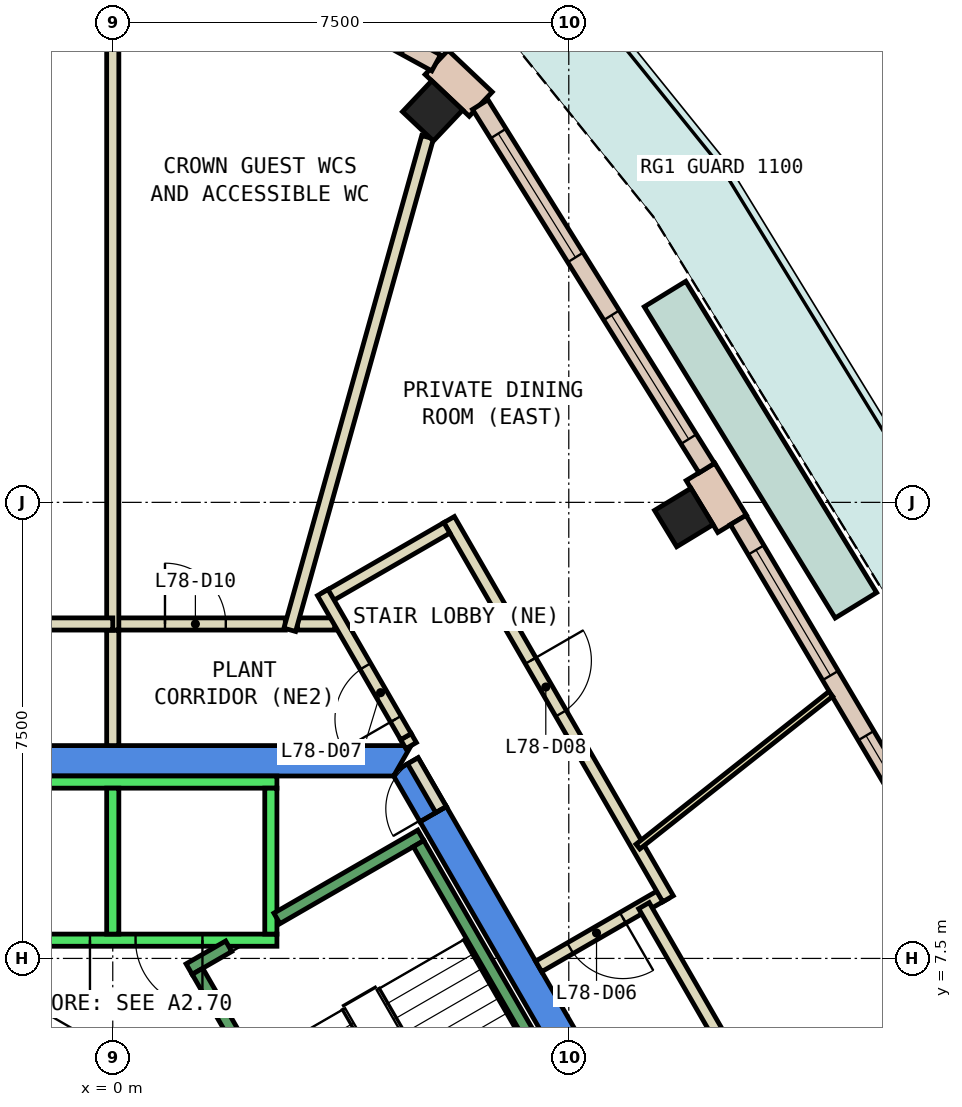
"""IFC4 building model, lengths in metres.
Left out: names, types, materials, properties, quantities, classifications, styles, units other than length and angle.
Written with IfcOpenShell. Run it as: python <this file> out.ifc"""

import sys

from ifc_helpers import new_model, si_unit, direction, frame, frame_2d, origin, origin_2d, place, context, subcontext, project, spatial, polyline, rectangle, outline, extrude, element, fill, save


model = new_model("IFC4")
c1 = context("Model", 3, precision=1e-05, world=origin(), true_north=direction((0.0, 1.0)))
c2 = subcontext(c1, "Body", "Model", "MODEL_VIEW")
j1 = project(units=[si_unit("LENGTHUNIT", "METRE"), si_unit("PLANEANGLEUNIT", "RADIAN")], contexts=[c1])
p1 = place(None, origin())
s1 = spatial("IfcSite", under=j1, at=p1, CompositionType="ELEMENT")
p2 = place(p1, origin())
s2 = spatial("IfcBuilding", under=s1, at=p2, CompositionType="ELEMENT")
p3 = place(p2, frame((0.0, 0.0, 331.4)))
s3 = spatial("IfcBuildingStorey", under=s2, at=p3, CompositionType="ELEMENT", Elevation=331.4)
for number, where, z_axis, x_axis in (
    (1, (9.392, 14.751, 0.0), (0.0, 0.0, 1.0), (-0.519, 0.855, 0.0)),
    (2, (5.26, 21.438, 0.0), (0.0, 0.0, 1.0), (-0.727, 0.687, 0.0)),
):
    element("IfcColumn", number, at=place(p3, frame(where, z_axis=z_axis, x_axis=x_axis)), inside=s3, PredefinedType="COLUMN", context=c2, shape_type="SweptSolid", body=[
        extrude(rectangle(XDim=0.7, YDim=0.7, at=origin_2d()), origin(), (0.0, 0.0, 1.0), 4.15),
    ])
p4 = place(p3, frame((0.0, 0.0, -0.45)))
e3 = element("IfcWall", 3, at=p4, inside=s3, PredefinedType="SHEAR", context=c2, shape_type="SweptSolid", body=[
    extrude(outline(polyline([(5.486, 9.998), (5.053, 9.748), (9.238, 2.5), (9.815, 2.5), (5.486, 9.998)])), origin(), (0.0, 0.0, 1.0), 4.6),
])
p5 = place(p3, frame((0.0, 0.0, 3.6)))
e4 = element("IfcWall", 4, at=p5, inside=s3, PredefinedType="SHEAR", context=c2, shape_type="SweptSolid", body=[
    extrude(outline(polyline([(5.022, 10.8), (4.677, 10.601), (4.619, 10.5), (5.053, 9.748), (5.486, 9.998), (5.022, 10.8)])), origin(), (0.0, 0.0, 1.0), 0.55),
])
p6 = place(p3, frame((0.0, 0.0, -0.45)))
e5 = element("IfcWall", 5, at=p6, inside=s3, PredefinedType="SHEAR", context=c2, shape_type="SweptSolid", body=[
    extrude(outline(polyline([(4.907, 11.0), (-4.907, 11.0), (-4.619, 10.5), (4.619, 10.5), (4.907, 11.0)])), origin(), (0.0, 0.0, 1.0), 4.6),
])
p7 = place(p3, frame((10.186, 14.648, 0.0), z_axis=(0.0, 0.0, 1.0), x_axis=(-0.520086370604, 0.854113673414, 0.0)))
e6 = element("IfcWall", 6, at=p7, inside=s3, PredefinedType="STANDARD", context=c2, shape_type="SweptSolid", body=[
    extrude(rectangle(XDim=1.0, YDim=0.55, at=frame_2d((0.5, 0.0))), origin(), (0.0, 0.0, 1.0), 4.15),
])
p8 = place(p3, frame((6.052, 21.549, 0.0), z_axis=(0.0, 0.0, 1.0), x_axis=(-0.726376136967, 0.687297393888, 0.0)))
e7 = element("IfcWall", 7, at=p8, inside=s3, PredefinedType="STANDARD", context=c2, shape_type="SweptSolid", body=[
    extrude(rectangle(XDim=1.0, YDim=0.55, at=frame_2d((0.5, 0.0))), origin(), (0.0, 0.0, 1.0), 4.15),
])
p9 = place(p3, frame((13.905, 8.604, 0.0), z_axis=(0.0, 0.0, 1.0), x_axis=(-0.509697735304, 0.86035354281, 0.0)))
e8 = element("IfcWall", 8, at=p9, inside=s3, PredefinedType="STANDARD", context=c2, shape_type="SweptSolid", body=[
    extrude(rectangle(XDim=7.098, YDim=0.3, at=frame_2d((3.549, 0.0))), origin(), (0.0, 0.0, 1.0), 4.15),
])
p10 = place(p9, frame((0.575, 0.0, 0.9)))
e9 = element("IfcOpeningElement", 9, at=p10, cuts=e8, PredefinedType="OPENING", context=c2, shape_type="SweptSolid", body=[
    extrude(rectangle(XDim=2.4, YDim=3.0, at=frame_2d((1.2, 1.5))), frame((0.0, 0.16, 0.0), z_axis=(0.0, -1.0, 0.0), x_axis=(1.0, 0.0, 0.0)), (0.0, 0.0, 1.0), 0.32),
])
p11 = place(p9, frame((4.124, 0.0, 0.9)))
e10 = element("IfcOpeningElement", 10, at=p11, cuts=e8, PredefinedType="OPENING", context=c2, shape_type="SweptSolid", body=[
    extrude(rectangle(XDim=2.4, YDim=3.0, at=frame_2d((1.2, 1.5))), frame((0.0, 0.16, 0.0), z_axis=(0.0, -1.0, 0.0), x_axis=(1.0, 0.0, 0.0)), (0.0, 0.0, 1.0), 0.32),
])
p12 = place(p3, frame((9.769, 15.564, 0.0), z_axis=(0.0, 0.0, 1.0), x_axis=(-0.528920387505, 0.848671446251, 0.0)))
e11 = element("IfcWall", 11, at=p12, inside=s3, PredefinedType="STANDARD", context=c2, shape_type="SweptSolid", body=[
    extrude(rectangle(XDim=7.043, YDim=0.3, at=frame_2d((3.521, 0.0))), origin(), (0.0, 0.0, 1.0), 4.15),
])
p13 = place(p12, frame((0.561, 0.0, 0.9)))
e12 = element("IfcOpeningElement", 12, at=p13, cuts=e11, PredefinedType="OPENING", context=c2, shape_type="SweptSolid", body=[
    extrude(rectangle(XDim=2.4, YDim=3.0, at=frame_2d((1.2, 1.5))), frame((0.0, 0.16, 0.0), z_axis=(0.0, -1.0, 0.0), x_axis=(1.0, 0.0, 0.0)), (0.0, 0.0, 1.0), 0.32),
])
p14 = place(p12, frame((4.082, 0.0, 0.9)))
e13 = element("IfcOpeningElement", 13, at=p14, cuts=e11, PredefinedType="OPENING", context=c2, shape_type="SweptSolid", body=[
    extrude(rectangle(XDim=2.4, YDim=3.0, at=frame_2d((1.2, 1.5))), frame((0.0, 0.16, 0.0), z_axis=(0.0, -1.0, 0.0), x_axis=(1.0, 0.0, 0.0)), (0.0, 0.0, 1.0), 0.32),
])
p15 = place(p3, frame((5.319, 22.227, 0.0), z_axis=(0.0, 0.0, 1.0), x_axis=(-0.877068569324, 0.480365199305, 0.0)))
e14 = element("IfcWall", 14, at=p15, inside=s3, PredefinedType="STANDARD", context=c2, shape_type="SweptSolid", body=[
    extrude(rectangle(XDim=5.04, YDim=0.3, at=frame_2d((2.52, 0.0))), origin(), (0.0, 0.0, 1.0), 4.15),
])
p16 = place(p15, frame((0.56, 0.0, 0.9)))
e15 = element("IfcOpeningElement", 15, at=p16, cuts=e14, PredefinedType="OPENING", context=c2, shape_type="SweptSolid", body=[
    extrude(rectangle(XDim=1.4, YDim=3.0, at=frame_2d((0.7, 1.5))), frame((0.0, 0.16, 0.0), z_axis=(0.0, -1.0, 0.0), x_axis=(1.0, 0.0, 0.0)), (0.0, 0.0, 1.0), 0.32),
])
p17 = place(p15, frame((3.08, 0.0, 0.9)))
e16 = element("IfcOpeningElement", 16, at=p17, cuts=e14, PredefinedType="OPENING", context=c2, shape_type="SweptSolid", body=[
    extrude(rectangle(XDim=1.4, YDim=3.0, at=frame_2d((0.7, 1.5))), frame((0.0, 0.16, 0.0), z_axis=(0.0, -1.0, 0.0), x_axis=(1.0, 0.0, 0.0)), (0.0, 0.0, 1.0), 0.32),
])
p18 = place(p3, frame((-0.899, 24.648, 0.0), z_axis=(0.0, 0.0, 1.0), x_axis=(-0.877068569324, -0.480365199305, 0.0)))
e17 = element("IfcWall", 17, at=p18, inside=s3, PredefinedType="STANDARD", context=c2, shape_type="SweptSolid", body=[
    extrude(rectangle(XDim=5.04, YDim=0.3, at=frame_2d((2.52, 0.0))), origin(), (0.0, 0.0, 1.0), 4.15),
])
p19 = place(p18, frame((0.56, 0.0, 0.9)))
e18 = element("IfcOpeningElement", 18, at=p19, cuts=e17, PredefinedType="OPENING", context=c2, shape_type="SweptSolid", body=[
    extrude(rectangle(XDim=1.4, YDim=3.0, at=frame_2d((0.7, 1.5))), frame((0.0, 0.16, 0.0), z_axis=(0.0, -1.0, 0.0), x_axis=(1.0, 0.0, 0.0)), (0.0, 0.0, 1.0), 0.32),
])
p20 = place(p18, frame((3.08, 0.0, 0.9)))
e19 = element("IfcOpeningElement", 19, at=p20, cuts=e17, PredefinedType="OPENING", context=c2, shape_type="SweptSolid", body=[
    extrude(rectangle(XDim=1.4, YDim=3.0, at=frame_2d((0.7, 1.5))), frame((0.0, 0.16, 0.0), z_axis=(0.0, -1.0, 0.0), x_axis=(1.0, 0.0, 0.0)), (0.0, 0.0, 1.0), 0.32),
])
p21 = place(p3, frame((12.222, 13.307, 0.0), z_axis=(0.0, 0.0, 1.0), x_axis=(-0.522728889832, 0.852498978143, 0.0)))
e20 = element("IfcWall", 20, at=p21, inside=s3, PredefinedType="STANDARD", context=c2, shape_type="SweptSolid", body=[
    extrude(rectangle(XDim=6.005, YDim=0.8, at=frame_2d((3.002, 0.0))), origin(), (0.0, 0.0, 1.0), 0.8),
])
p22 = place(p3, frame((9.082, 8.568, 0.0), z_axis=(0.0, 0.0, 1.0), x_axis=(-0.865955154139, -0.50012165622, 0.0)))
e21 = element("IfcWall", 21, at=p22, inside=s3, PredefinedType="PARTITIONING", context=c2, shape_type="SweptSolid", body=[
    extrude(rectangle(XDim=2.4, YDim=0.2, at=frame_2d((1.2, 0.0))), origin(), (0.0, 0.0, 1.0), 4.15),
])
p23 = place(p22, frame((0.8, 0.0, 0.0)))
e22 = element("IfcOpeningElement", 22, at=p23, cuts=e21, PredefinedType="OPENING", context=c2, shape_type="SweptSolid", body=[
    extrude(rectangle(XDim=1.0, YDim=2.1, at=frame_2d((0.5, 1.05))), frame((0.0, 0.11, 0.0), z_axis=(0.0, -1.0, 0.0), x_axis=(1.0, 0.0, 0.0)), (0.0, 0.0, 1.0), 0.22),
])
p24 = place(p3, frame((4.907, 11.0, 0.0), z_axis=(0.0, 0.0, 1.0), x_axis=(-0.5004692653, 0.865754303766, 0.0)))
e23 = element("IfcWall", 23, at=p24, inside=s3, PredefinedType="PARTITIONING", context=c2, shape_type="SweptSolid", body=[
    extrude(rectangle(XDim=0.17, YDim=0.2, at=frame_2d((0.085, 0.0))), origin(), (0.0, 0.0, 1.0), 2.4),
])
p25 = place(p3, frame((5.532, 14.717, 0.0), z_axis=(0.0, 0.0, 1.0), x_axis=(0.499968011863, -0.866043871356, 0.0)))
e24 = element("IfcWall", 24, at=p25, inside=s3, PredefinedType="PARTITIONING", context=c2, shape_type="SweptSolid", body=[
    extrude(rectangle(XDim=7.201, YDim=0.2, at=frame_2d((3.6, 0.0))), origin(), (0.0, 0.0, 1.0), 4.15),
])
p26 = place(p25, frame((2.68, 0.0, 0.0)))
e25 = element("IfcOpeningElement", 25, at=p26, cuts=e24, PredefinedType="OPENING", context=c2, shape_type="SweptSolid", body=[
    extrude(rectangle(XDim=1.0, YDim=2.1, at=frame_2d((0.5, 1.05))), frame((0.0, 0.11, 0.0), z_axis=(0.0, -1.0, 0.0), x_axis=(1.0, 0.0, 0.0)), (0.0, 0.0, 1.0), 0.22),
])
p27 = place(p3, frame((3.504, 13.43, 0.0), z_axis=(0.0, 0.0, 1.0), x_axis=(0.865927408828, 0.500169693844, 0.0)))
e26 = element("IfcWall", 26, at=p27, inside=s3, PredefinedType="PARTITIONING", context=c2, shape_type="SweptSolid", body=[
    extrude(rectangle(XDim=2.3, YDim=0.2, at=frame_2d((1.15, 0.0))), origin(), (0.0, 0.0, 1.0), 4.15),
])
p28 = place(p3, frame((8.736, 8.368, 0.0), z_axis=(0.0, 0.0, 1.0), x_axis=(0.499995994493, -0.866027716353, 0.0)))
e27 = element("IfcWall", 27, at=p28, inside=s3, PredefinedType="PARTITIONING", context=c2, shape_type="SweptSolid", body=[
    extrude(rectangle(XDim=6.876, YDim=0.2, at=frame_2d((3.438, 0.0))), origin(), (0.0, 0.0, 1.0), 4.15),
])
p29 = place(p28, frame((5.726, 0.0, 0.0)))
e28 = element("IfcOpeningElement", 28, at=p29, cuts=e27, PredefinedType="OPENING", context=c2, shape_type="SweptSolid", body=[
    extrude(rectangle(XDim=1.0, YDim=2.1, at=frame_2d((0.5, 1.05))), frame((0.0, 0.11, 0.0), z_axis=(0.0, -1.0, 0.0), x_axis=(1.0, 0.0, 0.0)), (0.0, 0.0, 1.0), 0.22),
])
p30 = place(p3, frame((3.038, 13.0, 0.0), z_axis=(0.0, 0.0, 1.0), x_axis=(1.0, 0.0, 0.0)))
e29 = element("IfcWall", 29, at=p30, inside=s3, PredefinedType="PARTITIONING", context=c2, shape_type="SweptSolid", body=[
    extrude(rectangle(XDim=0.614, YDim=0.2, at=frame_2d((0.307, 0.0))), origin(), (0.0, 0.0, 1.0), 4.15),
])
p31 = place(p3, frame((0.0, 13.0, 0.0), z_axis=(0.0, 0.0, 1.0), x_axis=(1.0, 0.0, 0.0)))
e30 = element("IfcWall", 30, at=p31, inside=s3, PredefinedType="PARTITIONING", context=c2, shape_type="SweptSolid", body=[
    extrude(rectangle(XDim=2.838, YDim=0.2, at=frame_2d((1.419, 0.0))), origin(), (0.0, 0.0, 1.0), 4.15),
])
p32 = place(p31, frame((0.859, 0.0, 0.0)))
e31 = element("IfcOpeningElement", 31, at=p32, cuts=e30, PredefinedType="OPENING", context=c2, shape_type="SweptSolid", body=[
    extrude(rectangle(XDim=1.0, YDim=2.1, at=frame_2d((0.5, 1.05))), frame((0.0, 0.11, 0.0), z_axis=(0.0, -1.0, 0.0), x_axis=(1.0, 0.0, 0.0)), (0.0, 0.0, 1.0), 0.22),
])
p33 = place(p3, frame((0.0, 11.0, 0.0), z_axis=(0.0, 0.0, 1.0), x_axis=(0.0, 1.0, 0.0)))
e32 = element("IfcWall", 32, at=p33, inside=s3, PredefinedType="PARTITIONING", context=c2, shape_type="SweptSolid", body=[
    extrude(rectangle(XDim=1.9, YDim=0.2, at=frame_2d((0.95, 0.0))), origin(), (0.0, 0.0, 1.0), 4.15),
])
p34 = place(p3, frame((11.808, 11.849, 0.0), z_axis=(0.0, 0.0, 1.0), x_axis=(-0.784103353093, -0.620630269701, 0.0)))
e33 = element("IfcWall", 33, at=p34, inside=s3, PredefinedType="PARTITIONING", context=c2, shape_type="SweptSolid", body=[
    extrude(rectangle(XDim=4.044, YDim=0.1, at=frame_2d((2.022, 0.0))), origin(), (0.0, 0.0, 1.0), 4.15),
])
p35 = place(p3, frame((2.911, 12.904, 0.0), z_axis=(0.0, 0.0, 1.0), x_axis=(0.269466315524, 0.963009815525, 0.0)))
e34 = element("IfcWall", 34, at=p35, inside=s3, PredefinedType="PARTITIONING", context=c2, shape_type="SweptSolid", body=[
    extrude(rectangle(XDim=8.413, YDim=0.2, at=frame_2d((4.207, 0.0))), origin(), (0.0, 0.0, 1.0), 4.15),
])
p36 = place(p3, frame((0.0, 12.9, 0.0), z_axis=(0.0, 0.0, 1.0), x_axis=(0.0, 1.0, 0.0)))
e35 = element("IfcWall", 35, at=p36, inside=s3, PredefinedType="PARTITIONING", context=c2, shape_type="SweptSolid", body=[
    extrude(rectangle(XDim=10.092, YDim=0.2, at=frame_2d((5.046, 0.0))), origin(), (0.0, 0.0, 1.0), 4.15),
])
p37 = place(p3, frame((-5.962, 13.0, 0.0), z_axis=(0.0, 0.0, 1.0), x_axis=(1.0, 0.0, 0.0)))
e36 = element("IfcWall", 36, at=p37, inside=s3, PredefinedType="PARTITIONING", context=c2, shape_type="SweptSolid", body=[
    extrude(rectangle(XDim=5.962, YDim=0.2, at=frame_2d((2.981, 0.0))), origin(), (0.0, 0.0, 1.0), 4.15),
])
p38 = place(p3, frame((5.399, 9.948, 0.0), z_axis=(0.0, 0.0, 1.0), x_axis=(-0.499882215713, 0.866093395895, 0.0)))
e37 = element("IfcWall", 37, at=p38, inside=s3, PredefinedType="PARTITIONING", context=c2, shape_type="SweptSolid", body=[
    extrude(rectangle(XDim=0.926, YDim=0.2, at=frame_2d((0.463, 0.0))), origin(), (0.0, 0.0, 1.0), 2.4),
])
p39 = place(p38, frame((0.017, 0.0, 0.0)))
e38 = element("IfcOpeningElement", 38, at=p39, cuts=e37, PredefinedType="OPENING", context=c2, shape_type="SweptSolid", body=[
    extrude(rectangle(XDim=0.9, YDim=2.1, at=frame_2d((0.45, 1.05))), frame((0.0, 0.11, 0.0), z_axis=(0.0, -1.0, 0.0), x_axis=(1.0, 0.0, 0.0)), (0.0, 0.0, 1.0), 0.22),
])
p40 = place(p3, frame((4.822, 11.147, 0.0), z_axis=(0.0, 0.0, 1.0), x_axis=(-0.499871764879, 0.866099427708, 0.0)))
e39 = element("IfcWall", 39, at=p40, inside=s3, PredefinedType="PARTITIONING", context=c2, shape_type="SweptSolid", body=[
    extrude(rectangle(XDim=2.737, YDim=0.2, at=frame_2d((1.368, 0.0))), origin(), (0.0, 0.0, 1.0), 4.15),
])
p41 = place(p40, frame((0.335, 0.0, 0.0)))
e40 = element("IfcOpeningElement", 40, at=p41, cuts=e39, PredefinedType="OPENING", context=c2, shape_type="SweptSolid", body=[
    extrude(rectangle(XDim=1.0, YDim=2.1, at=frame_2d((0.5, 1.05))), frame((0.0, 0.11, 0.0), z_axis=(0.0, -1.0, 0.0), x_axis=(1.0, 0.0, 0.0)), (0.0, 0.0, 1.0), 0.22),
])
p42 = place(p3, frame((2.7, 7.8, 0.0), z_axis=(0.0, 0.0, 1.0), x_axis=(-1.0, 0.0, 0.0)))
e41 = element("IfcWall", 41, at=p42, inside=s3, PredefinedType="STANDARD", context=c2, shape_type="SweptSolid", body=[
    extrude(rectangle(XDim=5.4, YDim=0.2, at=frame_2d((2.7, 0.0))), origin(), (0.0, 0.0, 1.0), 4.15),
])
p43 = place(p42, frame((1.225, 0.0, 0.0)))
e42 = element("IfcOpeningElement", 42, at=p43, cuts=e41, PredefinedType="OPENING", context=c2, shape_type="SweptSolid", body=[
    extrude(rectangle(XDim=1.1, YDim=2.1, at=frame_2d((0.55, 1.05))), frame((0.0, 0.11, 0.0), z_axis=(0.0, -1.0, 0.0), x_axis=(1.0, 0.0, 0.0)), (0.0, 0.0, 1.0), 0.22),
])
p44 = place(p42, frame((3.075, 0.0, 0.0)))
e43 = element("IfcOpeningElement", 43, at=p44, cuts=e41, PredefinedType="OPENING", context=c2, shape_type="SweptSolid", body=[
    extrude(rectangle(XDim=1.1, YDim=2.1, at=frame_2d((0.55, 1.05))), frame((0.0, 0.11, 0.0), z_axis=(0.0, -1.0, 0.0), x_axis=(1.0, 0.0, 0.0)), (0.0, 0.0, 1.0), 0.22),
])
p45 = place(p3, frame((2.7, 10.4, 0.0), z_axis=(0.0, 0.0, 1.0), x_axis=(-1.0, 0.0, 0.0)))
e44 = element("IfcWall", 44, at=p45, inside=s3, PredefinedType="STANDARD", context=c2, shape_type="SweptSolid", body=[
    extrude(rectangle(XDim=5.4, YDim=0.2, at=frame_2d((2.7, 0.0))), origin(), (0.0, 0.0, 1.0), 4.15),
])
for number, where, z_axis, x_axis in (
    (45, (2.6, 7.9, 0.0), (0.0, 0.0, 1.0), (0.0, 1.0, 0.0)),
    (46, (0.0, 7.9, 0.0), (0.0, 0.0, 1.0), (0.0, 1.0, 0.0)),
):
    element("IfcWall", number, at=place(p3, frame(where, z_axis=z_axis, x_axis=x_axis)), inside=s3, PredefinedType="STANDARD", context=c2, shape_type="SweptSolid", body=[
        extrude(rectangle(XDim=2.4, YDim=0.2, at=frame_2d((1.2, 0.0))), origin(), (0.0, 0.0, 1.0), 4.15),
    ])
p46 = place(p3, frame((2.7, 8.158, 0.0), z_axis=(0.0, 0.0, 1.0), x_axis=(0.86611865017, 0.499838457731, 0.0)))
e47 = element("IfcWall", 47, at=p46, inside=s3, PredefinedType="STANDARD", context=c2, shape_type="SweptSolid", body=[
    extrude(rectangle(XDim=2.733, YDim=0.2, at=frame_2d((1.366, 0.0))), origin(), (0.0, 0.0, 1.0), 4.15),
])
p47 = place(p3, frame((1.256, 7.324, 0.0), z_axis=(0.0, 0.0, 1.0), x_axis=(0.865915093549, 0.500191014278, 0.0)))
e48 = element("IfcWall", 48, at=p47, inside=s3, PredefinedType="STANDARD", context=c2, shape_type="SweptSolid", body=[
    extrude(rectangle(XDim=0.752, YDim=0.2, at=frame_2d((0.376, 0.0))), origin(), (0.0, 0.0, 1.0), 4.15),
])
p48 = place(p3, frame((4.843, 1.312, 0.0), z_axis=(0.0, 0.0, 1.0), x_axis=(-0.499963383562, 0.866046543262, 0.0)))
e49 = element("IfcWall", 49, at=p48, inside=s3, PredefinedType="STANDARD", context=c2, shape_type="SweptSolid", body=[
    extrude(rectangle(XDim=6.9, YDim=0.2, at=frame_2d((3.45, 0.0))), origin(), (0.0, 0.0, 1.0), 4.15),
])
p49 = place(p48, frame((0.45, 0.0, 0.0)))
e50 = element("IfcOpeningElement", 50, at=p49, cuts=e49, PredefinedType="OPENING", context=c2, shape_type="SweptSolid", body=[
    extrude(rectangle(XDim=1.1, YDim=2.2, at=frame_2d((0.55, 1.1))), frame((0.0, 0.11, 0.0), z_axis=(0.0, -1.0, 0.0), x_axis=(1.0, 0.0, 0.0)), (0.0, 0.0, 1.0), 0.22),
])
p50 = place(p3, frame((8.48, 3.412, 0.0), z_axis=(0.0, 0.0, 1.0), x_axis=(-0.499978703459, 0.866037698999, 0.0)))
e51 = element("IfcWall", 51, at=p50, inside=s3, PredefinedType="STANDARD", context=c2, shape_type="SweptSolid", body=[
    extrude(rectangle(XDim=6.9, YDim=0.2, at=frame_2d((3.45, 0.0))), origin(), (0.0, 0.0, 1.0), 4.15),
])
p51 = place(p10, origin())
e52 = element("IfcWindow", 52, at=p51, inside=s3, PartitioningType="SINGLE_PANEL", PredefinedType="WINDOW", context=c2, shape_type="SweptSolid", body=[
    extrude(rectangle(XDim=2.4, YDim=3.0, at=frame_2d((1.2, 1.5))), frame((0.0, 0.03, 0.0), z_axis=(0.0, -1.0, 0.0), x_axis=(1.0, 0.0, 0.0)), (0.0, 0.0, 1.0), 0.06),
])
fill(e9, e52)
p52 = place(p11, origin())
e53 = element("IfcWindow", 53, at=p52, inside=s3, PartitioningType="SINGLE_PANEL", PredefinedType="WINDOW", context=c2, shape_type="SweptSolid", body=[
    extrude(rectangle(XDim=2.4, YDim=3.0, at=frame_2d((1.2, 1.5))), frame((0.0, 0.03, 0.0), z_axis=(0.0, -1.0, 0.0), x_axis=(1.0, 0.0, 0.0)), (0.0, 0.0, 1.0), 0.06),
])
fill(e10, e53)
p53 = place(p13, origin())
e54 = element("IfcWindow", 54, at=p53, inside=s3, PartitioningType="SINGLE_PANEL", PredefinedType="WINDOW", context=c2, shape_type="SweptSolid", body=[
    extrude(rectangle(XDim=2.4, YDim=3.0, at=frame_2d((1.2, 1.5))), frame((0.0, 0.03, 0.0), z_axis=(0.0, -1.0, 0.0), x_axis=(1.0, 0.0, 0.0)), (0.0, 0.0, 1.0), 0.06),
])
fill(e12, e54)
p54 = place(p14, origin())
e55 = element("IfcWindow", 55, at=p54, inside=s3, PartitioningType="SINGLE_PANEL", PredefinedType="WINDOW", context=c2, shape_type="SweptSolid", body=[
    extrude(rectangle(XDim=2.4, YDim=3.0, at=frame_2d((1.2, 1.5))), frame((0.0, 0.03, 0.0), z_axis=(0.0, -1.0, 0.0), x_axis=(1.0, 0.0, 0.0)), (0.0, 0.0, 1.0), 0.06),
])
fill(e13, e55)
p55 = place(p23, origin())
e56 = element("IfcDoor", 56, at=p55, inside=s3, OperationType="SINGLE_SWING_LEFT", PredefinedType="DOOR", context=c2, shape_type="SweptSolid", body=[
    extrude(rectangle(XDim=1.0, YDim=2.1, at=frame_2d((0.5, 1.05))), frame((0.0, 0.025, 0.0), z_axis=(0.0, -1.0, 0.0), x_axis=(1.0, 0.0, 0.0)), (0.0, 0.0, 1.0), 0.05),
])
fill(e22, e56)
p56 = place(p41, origin())
e57 = element("IfcDoor", 57, at=p56, inside=s3, OperationType="SINGLE_SWING_RIGHT", PredefinedType="DOOR", context=c2, shape_type="SweptSolid", body=[
    extrude(rectangle(XDim=1.0, YDim=2.1, at=frame_2d((0.5, 1.05))), frame((0.0, 0.025, 0.0), z_axis=(0.0, -1.0, 0.0), x_axis=(1.0, 0.0, 0.0)), (0.0, 0.0, 1.0), 0.05),
])
fill(e40, e57)
p57 = place(p26, origin())
e58 = element("IfcDoor", 58, at=p57, inside=s3, OperationType="SINGLE_SWING_LEFT", PredefinedType="DOOR", context=c2, shape_type="SweptSolid", body=[
    extrude(rectangle(XDim=1.0, YDim=2.1, at=frame_2d((0.5, 1.05))), frame((0.0, 0.025, 0.0), z_axis=(0.0, -1.0, 0.0), x_axis=(1.0, 0.0, 0.0)), (0.0, 0.0, 1.0), 0.05),
])
fill(e25, e58)
p58 = place(p32, origin())
e59 = element("IfcDoor", 59, at=p58, inside=s3, OperationType="SINGLE_SWING_LEFT", PredefinedType="DOOR", context=c2, shape_type="SweptSolid", body=[
    extrude(rectangle(XDim=1.0, YDim=2.1, at=frame_2d((0.5, 1.05))), frame((0.0, 0.025, 0.0), z_axis=(0.0, -1.0, 0.0), x_axis=(1.0, 0.0, 0.0)), (0.0, 0.0, 1.0), 0.05),
])
fill(e31, e59)
p59 = place(p39, origin())
e60 = element("IfcDoor", 60, at=p59, inside=s3, OperationType="SINGLE_SWING_LEFT", PredefinedType="DOOR", context=c2, shape_type="SweptSolid", body=[
    extrude(rectangle(XDim=0.9, YDim=2.1, at=frame_2d((0.45, 1.05))), frame((0.0, 0.025, 0.0), z_axis=(0.0, -1.0, 0.0), x_axis=(1.0, 0.0, 0.0)), (0.0, 0.0, 1.0), 0.05),
])
fill(e38, e60)
p60 = place(p43, origin())
e61 = element("IfcDoor", 61, at=p60, inside=s3, OperationType="SLIDING_TO_LEFT", PredefinedType="DOOR", context=c2, shape_type="SweptSolid", body=[
    extrude(rectangle(XDim=1.1, YDim=2.1, at=frame_2d((0.55, 1.05))), frame((0.0, 0.025, 0.0), z_axis=(0.0, -1.0, 0.0), x_axis=(1.0, 0.0, 0.0)), (0.0, 0.0, 1.0), 0.05),
])
fill(e42, e61)
p61 = place(p44, origin())
e62 = element("IfcDoor", 62, at=p61, inside=s3, OperationType="SLIDING_TO_LEFT", PredefinedType="DOOR", context=c2, shape_type="SweptSolid", body=[
    extrude(rectangle(XDim=1.1, YDim=2.1, at=frame_2d((0.55, 1.05))), frame((0.0, 0.025, 0.0), z_axis=(0.0, -1.0, 0.0), x_axis=(1.0, 0.0, 0.0)), (0.0, 0.0, 1.0), 0.05),
])
fill(e43, e62)
save(model, sys.argv[1])
